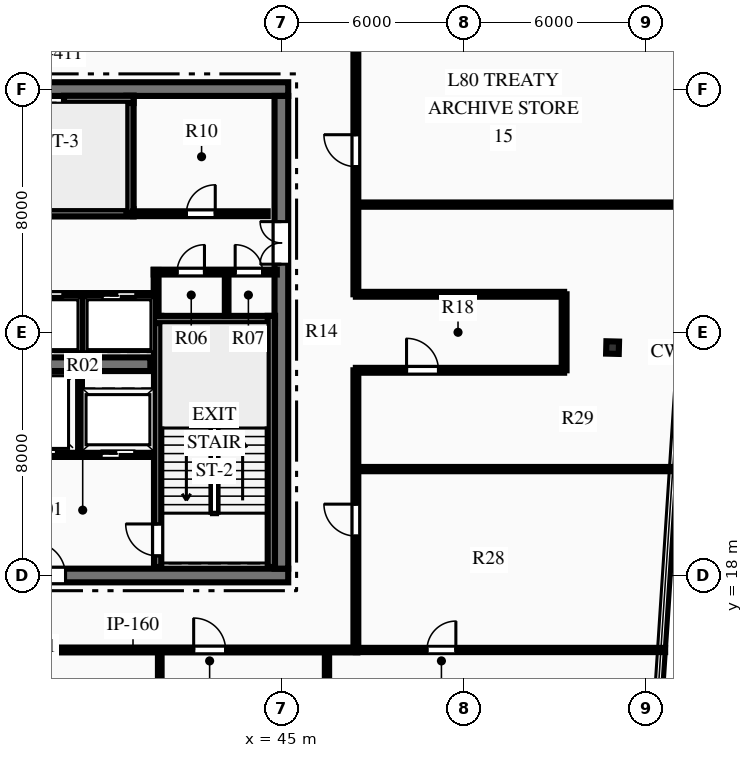
"""IFC4 building model, lengths in metres.
Left out: names, types, materials, properties, quantities, classifications, styles, units other than length and angle.
Written with IfcOpenShell. Run it as: python <this file> out.ifc"""

import sys

from ifc_helpers import new_model, si_unit, direction, frame, frame_2d, origin, origin_2d, place, context, subcontext, project, spatial, rectangle, i_section, extrude, element, fill, save


model = new_model("IFC4")
c1 = context("Model", 3, precision=1e-05, world=origin(), true_north=direction((0.0, 1.0)))
c2 = subcontext(c1, "Body", "Model", "MODEL_VIEW")
j1 = project(units=[si_unit("LENGTHUNIT", "METRE"), si_unit("PLANEANGLEUNIT", "RADIAN")], contexts=[c1])
p1 = place(None, origin())
s1 = spatial("IfcSite", under=j1, at=p1, CompositionType="ELEMENT")
p2 = place(p1, origin())
s2 = spatial("IfcBuilding", under=s1, at=p2, CompositionType="ELEMENT")
p3 = place(p2, frame((0.0, 0.0, 317.7)))
s3 = spatial("IfcBuildingStorey", under=s2, at=p3, CompositionType="ELEMENT", Elevation=317.7)
p4 = place(p3, frame((26.775, 18.0, 0.0), z_axis=(0.0, 0.0, 1.0), x_axis=(1.0, 0.0, 0.0)))
e1 = element("IfcWall", 1, at=p4, inside=s3, PredefinedType="SHEAR", context=c2, shape_type="SweptSolid", body=[
    extrude(rectangle(XDim=18.45, YDim=0.45, at=frame_2d((9.225, 0.0))), origin(), (0.0, 0.0, 1.0), 3.75),
])
p5 = place(p4, frame((7.325, 0.0, 0.0)))
e2 = element("IfcOpeningElement", 2, at=p5, cuts=e1, PredefinedType="OPENING", context=c2, shape_type="SweptSolid", body=[
    extrude(rectangle(XDim=1.1, YDim=2.15, at=frame_2d((0.55, 1.075))), frame((0.0, 0.235, 0.0), z_axis=(0.0, -1.0, 0.0), x_axis=(1.0, 0.0, 0.0)), (0.0, 0.0, 1.0), 0.47),
])
p6 = place(p4, frame((10.025, 0.0, 0.0)))
e3 = element("IfcOpeningElement", 3, at=p6, cuts=e1, PredefinedType="OPENING", context=c2, shape_type="SweptSolid", body=[
    extrude(rectangle(XDim=1.1, YDim=2.15, at=frame_2d((0.55, 1.075))), frame((0.0, 0.235, 0.0), z_axis=(0.0, -1.0, 0.0), x_axis=(1.0, 0.0, 0.0)), (0.0, 0.0, 1.0), 0.47),
])
p7 = place(p3, frame((26.775, 34.0, 0.0), z_axis=(0.0, 0.0, 1.0), x_axis=(1.0, 0.0, 0.0)))
e4 = element("IfcWall", 4, at=p7, inside=s3, PredefinedType="SHEAR", context=c2, shape_type="SweptSolid", body=[
    extrude(rectangle(XDim=18.45, YDim=0.45, at=frame_2d((9.225, 0.0))), origin(), (0.0, 0.0, 1.0), 3.75),
])
p8 = place(p3, frame((45.0, 18.225, 0.0), z_axis=(0.0, 0.0, 1.0), x_axis=(0.0, 1.0, 0.0)))
e5 = element("IfcWall", 5, at=p8, inside=s3, PredefinedType="SHEAR", context=c2, shape_type="SweptSolid", body=[
    extrude(rectangle(XDim=15.55, YDim=0.45, at=frame_2d((7.775, 0.0))), origin(), (0.0, 0.0, 1.0), 3.75),
])
p9 = place(p8, frame((10.015, 0.0, 0.0)))
e6 = element("IfcOpeningElement", 6, at=p9, cuts=e5, PredefinedType="OPENING", context=c2, shape_type="SweptSolid", body=[
    extrude(rectangle(XDim=1.4, YDim=2.2, at=frame_2d((0.7, 1.1))), frame((0.0, 0.235, 0.0), z_axis=(0.0, -1.0, 0.0), x_axis=(1.0, 0.0, 0.0)), (0.0, 0.0, 1.0), 0.47),
])
p10 = place(p3, frame((31.31, 24.95, 0.0), z_axis=(0.0, 0.0, 1.0), x_axis=(1.0, 0.0, 0.0)))
e7 = element("IfcWall", 7, at=p10, inside=s3, PredefinedType="SHEAR", context=c2, shape_type="SweptSolid", body=[
    extrude(rectangle(XDim=9.38, YDim=0.45, at=frame_2d((4.69, 0.0))), origin(), (0.0, 0.0, 1.0), 3.75),
])
p11 = place(p3, frame((40.93, 18.28, 0.0), z_axis=(0.0, 0.0, 1.0), x_axis=(0.0, 1.0, 0.0)))
e8 = element("IfcWall", 8, at=p11, inside=s3, PredefinedType="SHEAR", context=c2, shape_type="SweptSolid", body=[
    extrude(rectangle(XDim=8.26, YDim=0.24, at=frame_2d((4.13, 0.0))), origin(), (0.0, 0.0, 1.0), 3.75),
])
p12 = place(p11, frame((0.365, 0.0, 0.0)))
e9 = element("IfcOpeningElement", 9, at=p12, cuts=e8, PredefinedType="OPENING", context=c2, shape_type="SweptSolid", body=[
    extrude(rectangle(XDim=1.05, YDim=2.15, at=frame_2d((0.525, 1.075))), frame((0.0, 0.13, 0.0), z_axis=(0.0, -1.0, 0.0), x_axis=(1.0, 0.0, 0.0)), (0.0, 0.0, 1.0), 0.26),
])
p13 = place(p3, frame((40.81, 26.42, 0.0), z_axis=(0.0, 0.0, 1.0), x_axis=(1.0, 0.0, 0.0)))
e10 = element("IfcWall", 10, at=p13, inside=s3, PredefinedType="SHEAR", context=c2, shape_type="SweptSolid", body=[
    extrude(rectangle(XDim=3.98, YDim=0.24, at=frame_2d((1.99, 0.0))), origin(), (0.0, 0.0, 1.0), 3.75),
])
p14 = place(p3, frame((44.67, 18.28, 0.0), z_axis=(0.0, 0.0, 1.0), x_axis=(0.0, 1.0, 0.0)))
e11 = element("IfcWall", 11, at=p14, inside=s3, PredefinedType="SHEAR", context=c2, shape_type="SweptSolid", body=[
    extrude(rectangle(XDim=8.26, YDim=0.24, at=frame_2d((4.13, 0.0))), origin(), (0.0, 0.0, 1.0), 3.75),
])
p15 = place(p3, frame((31.76, 29.93, 0.0), z_axis=(0.0, 0.0, 1.0), x_axis=(1.0, 0.0, 0.0)))
e12 = element("IfcWall", 12, at=p15, inside=s3, PredefinedType="SHEAR", context=c2, shape_type="SweptSolid", body=[
    extrude(rectangle(XDim=8.38, YDim=0.24, at=frame_2d((4.19, 0.0))), origin(), (0.0, 0.0, 1.0), 3.75),
])
p16 = place(p15, frame((0.565, 0.0, 0.0)))
e13 = element("IfcOpeningElement", 13, at=p16, cuts=e12, PredefinedType="OPENING", context=c2, shape_type="SweptSolid", body=[
    extrude(rectangle(XDim=1.05, YDim=2.15, at=frame_2d((0.525, 1.075))), frame((0.0, 0.13, 0.0), z_axis=(0.0, -1.0, 0.0), x_axis=(1.0, 0.0, 0.0)), (0.0, 0.0, 1.0), 0.26),
])
p17 = place(p3, frame((40.02, 29.93, 0.0), z_axis=(0.0, 0.0, 1.0), x_axis=(0.0, 1.0, 0.0)))
e14 = element("IfcWall", 14, at=p17, inside=s3, PredefinedType="SHEAR", context=c2, shape_type="SweptSolid", body=[
    extrude(rectangle(XDim=3.85, YDim=0.24, at=frame_2d((1.925, 0.0))), origin(), (0.0, 0.0, 1.0), 3.75),
])
p18 = place(p3, frame((37.85, 33.66, 0.0), z_axis=(0.0, 0.0, 1.0), x_axis=(1.0, 0.0, 0.0)))
e15 = element("IfcWall", 15, at=p18, inside=s3, PredefinedType="SHEAR", context=c2, shape_type="SweptSolid", body=[
    extrude(rectangle(XDim=2.29, YDim=0.24, at=frame_2d((1.145, 0.0))), origin(), (0.0, 0.0, 1.0), 3.75),
])
p19 = place(p3, frame((55.894, 25.496, 0.0), z_axis=(0.0, 0.0, 1.0), x_axis=(0.025304572866, 0.999679788028, 0.0)))
e16 = element("IfcColumn", 16, at=p19, inside=s3, PredefinedType="COLUMN", context=c2, shape_type="SweptSolid", body=[
    extrude(i_section(OverallWidth=0.406, OverallDepth=0.416, WebThickness=0.03, FlangeThickness=0.048, at=origin_2d()), origin(), (0.0, 0.0, 1.0), 3.75),
])
p20 = place(p3, frame((36.12, 22.0, 0.0), z_axis=(0.0, 0.0, 1.0), x_axis=(1.0, 0.0, 0.0)))
e17 = element("IfcWall", 17, at=p20, inside=s3, PredefinedType="PARTITIONING", context=c2, shape_type="SweptSolid", body=[
    extrude(rectangle(XDim=4.69, YDim=0.2, at=frame_2d((2.345, 0.0))), origin(), (0.0, 0.0, 1.0), 3.49),
])
p21 = place(p20, frame((2.955, 0.0, 0.0)))
e18 = element("IfcOpeningElement", 18, at=p21, cuts=e17, PredefinedType="OPENING", context=c2, shape_type="SweptSolid", body=[
    extrude(rectangle(XDim=1.1, YDim=2.15, at=frame_2d((0.55, 1.075))), frame((0.0, 0.11, 0.0), z_axis=(0.0, -1.0, 0.0), x_axis=(1.0, 0.0, 0.0)), (0.0, 0.0, 1.0), 0.22),
])
p22 = place(p20, frame((0.08, 0.0, 0.0)))
e19 = element("IfcOpeningElement", 19, at=p22, cuts=e17, PredefinedType="OPENING", context=c2, shape_type="SweptSolid", body=[
    extrude(rectangle(XDim=1.4, YDim=2.2, at=frame_2d((0.7, 1.1))), frame((0.0, 0.11, 0.0), z_axis=(0.0, -1.0, 0.0), x_axis=(1.0, 0.0, 0.0)), (0.0, 0.0, 1.0), 0.22),
])
p23 = place(p3, frame((38.35, 22.05, 0.0), z_axis=(0.0, 0.0, 1.0), x_axis=(0.0, 1.0, 0.0)))
e20 = element("IfcWall", 20, at=p23, inside=s3, PredefinedType="PARTITIONING", context=c2, shape_type="SweptSolid", body=[
    extrude(rectangle(XDim=2.6, YDim=0.18, at=frame_2d((1.3, 0.0))), origin(), (0.0, 0.0, 1.0), 3.49),
])
p24 = place(p3, frame((40.8, 27.98, 0.0), z_axis=(0.0, 0.0, 1.0), x_axis=(1.0, 0.0, 0.0)))
e21 = element("IfcWall", 21, at=p24, inside=s3, PredefinedType="PARTITIONING", context=c2, shape_type="SweptSolid", body=[
    extrude(rectangle(XDim=4.05, YDim=0.16, at=frame_2d((2.025, 0.0))), origin(), (0.0, 0.0, 1.0), 3.49),
])
p25 = place(p24, frame((0.77, 0.0, 0.0)))
e22 = element("IfcOpeningElement", 22, at=p25, cuts=e21, PredefinedType="OPENING", context=c2, shape_type="SweptSolid", body=[
    extrude(rectangle(XDim=0.9, YDim=2.15, at=frame_2d((0.45, 1.075))), frame((0.0, 0.09, 0.0), z_axis=(0.0, -1.0, 0.0), x_axis=(1.0, 0.0, 0.0)), (0.0, 0.0, 1.0), 0.18),
])
p26 = place(p24, frame((2.68, 0.0, 0.0)))
e23 = element("IfcOpeningElement", 23, at=p26, cuts=e21, PredefinedType="OPENING", context=c2, shape_type="SweptSolid", body=[
    extrude(rectangle(XDim=0.9, YDim=2.15, at=frame_2d((0.45, 1.075))), frame((0.0, 0.09, 0.0), z_axis=(0.0, -1.0, 0.0), x_axis=(1.0, 0.0, 0.0)), (0.0, 0.0, 1.0), 0.18),
])
p27 = place(p3, frame((40.88, 26.54, 0.0), z_axis=(0.0, 0.0, 1.0), x_axis=(0.0, 1.0, 0.0)))
e24 = element("IfcWall", 24, at=p27, inside=s3, PredefinedType="PARTITIONING", context=c2, shape_type="SweptSolid", body=[
    extrude(rectangle(XDim=1.51, YDim=0.16, at=frame_2d((0.755, 0.0))), origin(), (0.0, 0.0, 1.0), 3.49),
])
p28 = place(p3, frame((43.2, 26.54, 0.0), z_axis=(0.0, 0.0, 1.0), x_axis=(0.0, 1.0, 0.0)))
e25 = element("IfcWall", 25, at=p28, inside=s3, PredefinedType="PARTITIONING", context=c2, shape_type="SweptSolid", body=[
    extrude(rectangle(XDim=1.44, YDim=0.12, at=frame_2d((0.72, 0.0))), origin(), (0.0, 0.0, 1.0), 3.49),
])
p29 = place(p3, frame((40.12, 29.9, 0.0), z_axis=(0.0, 0.0, 1.0), x_axis=(1.0, 0.0, 0.0)))
e26 = element("IfcWall", 26, at=p29, inside=s3, PredefinedType="PARTITIONING", context=c2, shape_type="SweptSolid", body=[
    extrude(rectangle(XDim=4.43, YDim=0.16, at=frame_2d((2.215, 0.0))), origin(), (0.0, 0.0, 1.0), 3.49),
])
p30 = place(p29, frame((1.755, 0.0, 0.0)))
e27 = element("IfcOpeningElement", 27, at=p30, cuts=e26, PredefinedType="OPENING", context=c2, shape_type="SweptSolid", body=[
    extrude(rectangle(XDim=0.95, YDim=2.15, at=frame_2d((0.475, 1.075))), frame((0.0, 0.09, 0.0), z_axis=(0.0, -1.0, 0.0), x_axis=(1.0, 0.0, 0.0)), (0.0, 0.0, 1.0), 0.18),
])
p31 = place(p3, frame((31.2, 27.2, 0.0), z_axis=(0.0, 0.0, 1.0), x_axis=(1.0, 0.0, 0.0)))
e28 = element("IfcWall", 28, at=p31, inside=s3, PredefinedType="PARTITIONING", context=c2, shape_type="SweptSolid", body=[
    extrude(rectangle(XDim=9.6, YDim=0.18, at=frame_2d((4.8, 0.0))), origin(), (0.0, 0.0, 1.0), 3.49),
])
p32 = place(p31, frame((0.59, 0.0, 0.0)))
e29 = element("IfcOpeningElement", 29, at=p32, cuts=e28, PredefinedType="OPENING", context=c2, shape_type="SweptSolid", body=[
    extrude(rectangle(XDim=1.1, YDim=2.15, at=frame_2d((0.55, 1.075))), frame((0.0, 0.1, 0.0), z_axis=(0.0, -1.0, 0.0), x_axis=(1.0, 0.0, 0.0)), (0.0, 0.0, 1.0), 0.2),
])
p33 = place(p31, frame((2.99, 0.0, 0.0)))
e30 = element("IfcOpeningElement", 30, at=p33, cuts=e28, PredefinedType="OPENING", context=c2, shape_type="SweptSolid", body=[
    extrude(rectangle(XDim=1.1, YDim=2.15, at=frame_2d((0.55, 1.075))), frame((0.0, 0.1, 0.0), z_axis=(0.0, -1.0, 0.0), x_axis=(1.0, 0.0, 0.0)), (0.0, 0.0, 1.0), 0.2),
])
p34 = place(p31, frame((5.51, 0.0, 0.0)))
e31 = element("IfcOpeningElement", 31, at=p34, cuts=e28, PredefinedType="OPENING", context=c2, shape_type="SweptSolid", body=[
    extrude(rectangle(XDim=1.1, YDim=2.15, at=frame_2d((0.55, 1.075))), frame((0.0, 0.1, 0.0), z_axis=(0.0, -1.0, 0.0), x_axis=(1.0, 0.0, 0.0)), (0.0, 0.0, 1.0), 0.2),
])
p35 = place(p31, frame((7.91, 0.0, 0.0)))
e32 = element("IfcOpeningElement", 32, at=p35, cuts=e28, PredefinedType="OPENING", context=c2, shape_type="SweptSolid", body=[
    extrude(rectangle(XDim=1.1, YDim=2.15, at=frame_2d((0.55, 1.075))), frame((0.0, 0.1, 0.0), z_axis=(0.0, -1.0, 0.0), x_axis=(1.0, 0.0, 0.0)), (0.0, 0.0, 1.0), 0.2),
])
p36 = place(p3, frame((38.46, 25.3, 0.0), z_axis=(0.0, 0.0, 1.0), x_axis=(0.0, 1.0, 0.0)))
e33 = element("IfcWall", 33, at=p36, inside=s3, PredefinedType="PARTITIONING", context=c2, shape_type="SweptSolid", body=[
    extrude(rectangle(XDim=1.9, YDim=0.18, at=frame_2d((0.95, 0.0))), origin(), (0.0, 0.0, 1.0), 3.49),
])
p37 = place(p3, frame((37.25, 15.55, 0.0), z_axis=(0.0, 0.0, 1.0), x_axis=(1.0, 0.0, 0.0)))
e34 = element("IfcWall", 34, at=p37, inside=s3, PredefinedType="PARTITIONING", context=c2, shape_type="SweptSolid", body=[
    extrude(rectangle(XDim=10.25, YDim=0.16, at=frame_2d((5.125, 0.0))), origin(), (0.0, 0.0, 1.0), 3.49),
])
p38 = place(p37, frame((4.865, 0.0, 0.0)))
e35 = element("IfcOpeningElement", 35, at=p38, cuts=e34, PredefinedType="OPENING", context=c2, shape_type="SweptSolid", body=[
    extrude(rectangle(XDim=1.05, YDim=2.15, at=frame_2d((0.525, 1.075))), frame((0.0, 0.09, 0.0), z_axis=(0.0, -1.0, 0.0), x_axis=(1.0, 0.0, 0.0)), (0.0, 0.0, 1.0), 0.18),
])
p39 = place(p3, frame((47.45, 15.55, 0.0), z_axis=(0.0, 0.0, 1.0), x_axis=(0.0, 1.0, 0.0)))
e36 = element("IfcWall", 36, at=p39, inside=s3, PredefinedType="PARTITIONING", context=c2, shape_type="SweptSolid", body=[
    extrude(rectangle(XDim=9.2, YDim=0.16, at=frame_2d((4.6, 0.0))), origin(), (0.0, 0.0, 1.0), 3.49),
])
p40 = place(p39, frame((3.747, 0.0, 0.0)))
e37 = element("IfcOpeningElement", 37, at=p40, cuts=e36, PredefinedType="OPENING", context=c2, shape_type="SweptSolid", body=[
    extrude(rectangle(XDim=1.05, YDim=2.15, at=frame_2d((0.525, 1.075))), frame((0.0, 0.09, 0.0), z_axis=(0.0, -1.0, 0.0), x_axis=(1.0, 0.0, 0.0)), (0.0, 0.0, 1.0), 0.18),
])
p41 = place(p3, frame((47.45, 27.25, 0.0), z_axis=(0.0, 0.0, 1.0), x_axis=(0.0, 1.0, 0.0)))
e38 = element("IfcWall", 38, at=p41, inside=s3, PredefinedType="PARTITIONING", context=c2, shape_type="SweptSolid", body=[
    extrude(rectangle(XDim=9.2, YDim=0.16, at=frame_2d((4.6, 0.0))), origin(), (0.0, 0.0, 1.0), 3.49),
])
p42 = place(p41, frame((4.199, 0.0, 0.0)))
e39 = element("IfcOpeningElement", 39, at=p42, cuts=e38, PredefinedType="OPENING", context=c2, shape_type="SweptSolid", body=[
    extrude(rectangle(XDim=1.05, YDim=2.15, at=frame_2d((0.525, 1.075))), frame((0.0, 0.09, 0.0), z_axis=(0.0, -1.0, 0.0), x_axis=(1.0, 0.0, 0.0)), (0.0, 0.0, 1.0), 0.18),
])
p43 = place(p3, frame((47.45, 24.75, 0.0), z_axis=(0.0, 0.0, 1.0), x_axis=(1.0, 0.0, 0.0)))
e40 = element("IfcWall", 40, at=p43, inside=s3, PredefinedType="PARTITIONING", context=c2, shape_type="SweptSolid", body=[
    extrude(rectangle(XDim=6.85, YDim=0.16, at=frame_2d((3.425, 0.0))), origin(), (0.0, 0.0, 1.0), 3.49),
])
p44 = place(p43, frame((1.667, 0.0, 0.0)))
e41 = element("IfcOpeningElement", 41, at=p44, cuts=e40, PredefinedType="OPENING", context=c2, shape_type="SweptSolid", body=[
    extrude(rectangle(XDim=1.05, YDim=2.15, at=frame_2d((0.525, 1.075))), frame((0.0, 0.09, 0.0), z_axis=(0.0, -1.0, 0.0), x_axis=(1.0, 0.0, 0.0)), (0.0, 0.0, 1.0), 0.18),
])
p45 = place(p3, frame((47.45, 27.25, 0.0), z_axis=(0.0, 0.0, 1.0), x_axis=(1.0, 0.0, 0.0)))
e42 = element("IfcWall", 42, at=p45, inside=s3, PredefinedType="PARTITIONING", context=c2, shape_type="SweptSolid", body=[
    extrude(rectangle(XDim=6.85, YDim=0.16, at=frame_2d((3.425, 0.0))), origin(), (0.0, 0.0, 1.0), 3.49),
])
p46 = place(p3, frame((54.3, 24.75, 0.0), z_axis=(0.0, 0.0, 1.0), x_axis=(0.0, 1.0, 0.0)))
e43 = element("IfcWall", 43, at=p46, inside=s3, PredefinedType="PARTITIONING", context=c2, shape_type="SweptSolid", body=[
    extrude(rectangle(XDim=2.5, YDim=0.16, at=frame_2d((1.25, 0.0))), origin(), (0.0, 0.0, 1.0), 3.49),
])
p47 = place(p3, frame((47.45, 15.55, 0.0), z_axis=(0.0, 0.0, 1.0), x_axis=(1.0, 0.0, 0.0)))
e44 = element("IfcWall", 44, at=p47, inside=s3, PredefinedType="PARTITIONING", context=c2, shape_type="SweptSolid", body=[
    extrude(rectangle(XDim=10.173, YDim=0.14, at=frame_2d((5.086, 0.0))), origin(), (0.0, 0.0, 1.0), 2.868),
])
p48 = place(p47, frame((2.339, 0.0, 0.0)))
e45 = element("IfcOpeningElement", 45, at=p48, cuts=e44, PredefinedType="OPENING", context=c2, shape_type="SweptSolid", body=[
    extrude(rectangle(XDim=0.95, YDim=2.15, at=frame_2d((0.475, 1.075))), frame((0.0, 0.08, 0.0), z_axis=(0.0, -1.0, 0.0), x_axis=(1.0, 0.0, 0.0)), (0.0, 0.0, 1.0), 0.16),
])
p49 = place(p3, frame((41.0, 3.064, 0.0), z_axis=(0.0, 0.0, 1.0), x_axis=(0.0, 1.0, 0.0)))
e46 = element("IfcWall", 46, at=p49, inside=s3, PredefinedType="PARTITIONING", context=c2, shape_type="SweptSolid", body=[
    extrude(rectangle(XDim=12.486, YDim=0.12, at=frame_2d((6.243, 0.0))), origin(), (0.0, 0.0, 1.0), 3.49),
])
p50 = place(p3, frame((46.5, 2.703, 0.0), z_axis=(0.0, 0.0, 1.0), x_axis=(0.0, 1.0, 0.0)))
e47 = element("IfcWall", 47, at=p50, inside=s3, PredefinedType="PARTITIONING", context=c2, shape_type="SweptSolid", body=[
    extrude(rectangle(XDim=12.847, YDim=0.14, at=frame_2d((6.423, 0.0))), origin(), (0.0, 0.0, 1.0), 2.868),
])
p51 = place(p3, frame((47.45, 21.5, 0.0), z_axis=(0.0, 0.0, 1.0), x_axis=(1.0, 0.0, 0.0)))
e48 = element("IfcWall", 48, at=p51, inside=s3, PredefinedType="PARTITIONING", context=c2, shape_type="SweptSolid", body=[
    extrude(rectangle(XDim=10.563, YDim=0.14, at=frame_2d((5.281, 0.0))), origin(), (0.0, 0.0, 1.0), 3.49),
])
p52 = place(p3, frame((47.45, 30.2, 0.0), z_axis=(0.0, 0.0, 1.0), x_axis=(1.0, 0.0, 0.0)))
e49 = element("IfcWall", 49, at=p52, inside=s3, PredefinedType="PARTITIONING", context=c2, shape_type="SweptSolid", body=[
    extrude(rectangle(XDim=11.133, YDim=0.14, at=frame_2d((5.566, 0.0))), origin(), (0.0, 0.0, 1.0), 3.49),
])
p53 = place(p25, origin())
e50 = element("IfcDoor", 50, at=p53, inside=s3, OperationType="SINGLE_SWING_RIGHT", PredefinedType="DOOR", context=c2, shape_type="SweptSolid", body=[
    extrude(rectangle(XDim=0.9, YDim=2.15, at=frame_2d((0.45, 1.075))), frame((0.0, 0.025, 0.0), z_axis=(0.0, -1.0, 0.0), x_axis=(1.0, 0.0, 0.0)), (0.0, 0.0, 1.0), 0.05),
])
fill(e22, e50)
p54 = place(p26, origin())
e51 = element("IfcDoor", 51, at=p54, inside=s3, OperationType="SINGLE_SWING_LEFT", PredefinedType="DOOR", context=c2, shape_type="SweptSolid", body=[
    extrude(rectangle(XDim=0.9, YDim=2.15, at=frame_2d((0.45, 1.075))), frame((0.0, 0.025, 0.0), z_axis=(0.0, -1.0, 0.0), x_axis=(1.0, 0.0, 0.0)), (0.0, 0.0, 1.0), 0.05),
])
fill(e23, e51)
p55 = place(p30, origin())
e52 = element("IfcDoor", 52, at=p55, inside=s3, OperationType="SINGLE_SWING_RIGHT", PredefinedType="DOOR", context=c2, shape_type="SweptSolid", body=[
    extrude(rectangle(XDim=0.95, YDim=2.15, at=frame_2d((0.475, 1.075))), frame((0.0, 0.025, 0.0), z_axis=(0.0, -1.0, 0.0), x_axis=(1.0, 0.0, 0.0)), (0.0, 0.0, 1.0), 0.05),
])
fill(e27, e52)
p56 = place(p12, origin())
e53 = element("IfcDoor", 53, at=p56, inside=s3, OperationType="SINGLE_SWING_RIGHT", PredefinedType="DOOR", context=c2, shape_type="SweptSolid", body=[
    extrude(rectangle(XDim=1.05, YDim=2.15, at=frame_2d((0.525, 1.075))), frame((0.0, 0.025, 0.0), z_axis=(0.0, -1.0, 0.0), x_axis=(1.0, 0.0, 0.0)), (0.0, 0.0, 1.0), 0.05),
])
fill(e9, e53)
p57 = place(p6, origin())
e54 = element("IfcDoor", 54, at=p57, inside=s3, OperationType="SINGLE_SWING_LEFT", PredefinedType="DOOR", context=c2, shape_type="SweptSolid", body=[
    extrude(rectangle(XDim=1.1, YDim=2.15, at=frame_2d((0.55, 1.075))), frame((0.0, 0.025, 0.0), z_axis=(0.0, -1.0, 0.0), x_axis=(1.0, 0.0, 0.0)), (0.0, 0.0, 1.0), 0.05),
])
fill(e3, e54)
p58 = place(p9, origin())
e55 = element("IfcDoor", 55, at=p58, inside=s3, OperationType="DOUBLE_DOOR_SINGLE_SWING", PredefinedType="DOOR", context=c2, shape_type="SweptSolid", body=[
    extrude(rectangle(XDim=1.4, YDim=2.2, at=frame_2d((0.7, 1.1))), frame((0.0, 0.025, 0.0), z_axis=(0.0, -1.0, 0.0), x_axis=(1.0, 0.0, 0.0)), (0.0, 0.0, 1.0), 0.05),
])
fill(e6, e55)
p59 = place(p38, origin())
e56 = element("IfcDoor", 56, at=p59, inside=s3, OperationType="SINGLE_SWING_LEFT", PredefinedType="DOOR", context=c2, shape_type="SweptSolid", body=[
    extrude(rectangle(XDim=1.05, YDim=2.15, at=frame_2d((0.525, 1.075))), frame((0.0, 0.025, 0.0), z_axis=(0.0, -1.0, 0.0), x_axis=(1.0, 0.0, 0.0)), (0.0, 0.0, 1.0), 0.05),
])
fill(e35, e56)
p60 = place(p48, origin())
e57 = element("IfcDoor", 57, at=p60, inside=s3, OperationType="SINGLE_SWING_RIGHT", PredefinedType="DOOR", context=c2, shape_type="SweptSolid", body=[
    extrude(rectangle(XDim=0.95, YDim=2.15, at=frame_2d((0.475, 1.075))), frame((0.0, 0.025, 0.0), z_axis=(0.0, -1.0, 0.0), x_axis=(1.0, 0.0, 0.0)), (0.0, 0.0, 1.0), 0.05),
])
fill(e45, e57)
p61 = place(p40, origin())
e58 = element("IfcDoor", 58, at=p61, inside=s3, OperationType="SINGLE_SWING_RIGHT", PredefinedType="DOOR", context=c2, shape_type="SweptSolid", body=[
    extrude(rectangle(XDim=1.05, YDim=2.15, at=frame_2d((0.525, 1.075))), frame((0.0, 0.025, 0.0), z_axis=(0.0, -1.0, 0.0), x_axis=(1.0, 0.0, 0.0)), (0.0, 0.0, 1.0), 0.05),
])
fill(e37, e58)
p62 = place(p44, origin())
e59 = element("IfcDoor", 59, at=p62, inside=s3, OperationType="SINGLE_SWING_LEFT", PredefinedType="DOOR", context=c2, shape_type="SweptSolid", body=[
    extrude(rectangle(XDim=1.05, YDim=2.15, at=frame_2d((0.525, 1.075))), frame((0.0, 0.025, 0.0), z_axis=(0.0, -1.0, 0.0), x_axis=(1.0, 0.0, 0.0)), (0.0, 0.0, 1.0), 0.05),
])
fill(e41, e59)
p63 = place(p42, origin())
e60 = element("IfcDoor", 60, at=p63, inside=s3, OperationType="SINGLE_SWING_RIGHT", PredefinedType="DOOR", context=c2, shape_type="SweptSolid", body=[
    extrude(rectangle(XDim=1.05, YDim=2.15, at=frame_2d((0.525, 1.075))), frame((0.0, 0.025, 0.0), z_axis=(0.0, -1.0, 0.0), x_axis=(1.0, 0.0, 0.0)), (0.0, 0.0, 1.0), 0.05),
])
fill(e39, e60)
p64 = place(p34, origin())
e61 = element("IfcDoor", 61, at=p64, inside=s3, OperationType="SLIDING_TO_LEFT", PredefinedType="DOOR", context=c2, shape_type="SweptSolid", body=[
    extrude(rectangle(XDim=1.1, YDim=2.15, at=frame_2d((0.55, 1.075))), frame((0.0, 0.025, 0.0), z_axis=(0.0, -1.0, 0.0), x_axis=(1.0, 0.0, 0.0)), (0.0, 0.0, 1.0), 0.05),
])
fill(e31, e61)
p65 = place(p35, origin())
e62 = element("IfcDoor", 62, at=p65, inside=s3, OperationType="SLIDING_TO_LEFT", PredefinedType="DOOR", context=c2, shape_type="SweptSolid", body=[
    extrude(rectangle(XDim=1.1, YDim=2.15, at=frame_2d((0.55, 1.075))), frame((0.0, 0.025, 0.0), z_axis=(0.0, -1.0, 0.0), x_axis=(1.0, 0.0, 0.0)), (0.0, 0.0, 1.0), 0.05),
])
fill(e32, e62)
p66 = place(p21, origin())
e63 = element("IfcDoor", 63, at=p66, inside=s3, OperationType="SLIDING_TO_LEFT", PredefinedType="DOOR", context=c2, shape_type="SweptSolid", body=[
    extrude(rectangle(XDim=1.1, YDim=2.15, at=frame_2d((0.55, 1.075))), frame((0.0, 0.025, 0.0), z_axis=(0.0, -1.0, 0.0), x_axis=(1.0, 0.0, 0.0)), (0.0, 0.0, 1.0), 0.05),
])
fill(e18, e63)
p67 = place(p22, origin())
e64 = element("IfcDoor", 64, at=p67, inside=s3, OperationType="SLIDING_TO_LEFT", PredefinedType="DOOR", context=c2, shape_type="SweptSolid", body=[
    extrude(rectangle(XDim=1.4, YDim=2.2, at=frame_2d((0.7, 1.1))), frame((0.0, 0.025, 0.0), z_axis=(0.0, -1.0, 0.0), x_axis=(1.0, 0.0, 0.0)), (0.0, 0.0, 1.0), 0.05),
])
fill(e19, e64)
save(model, sys.argv[1])
